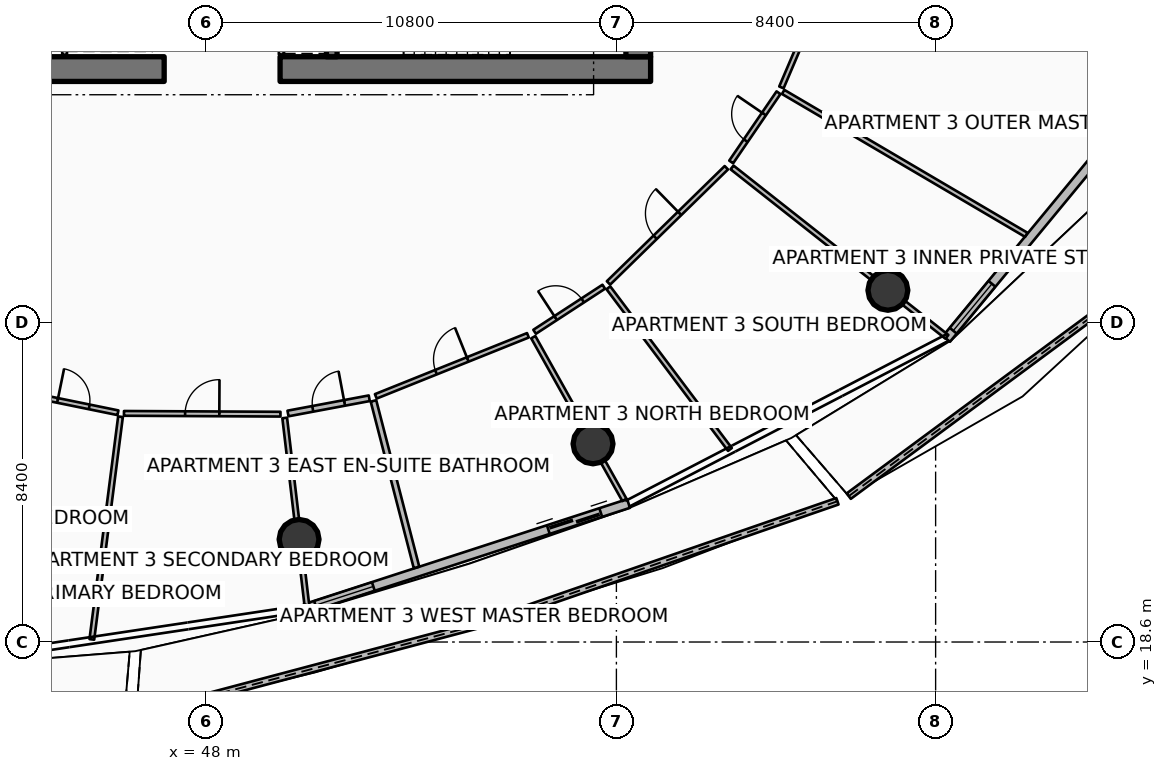
"""IFC4 building model, lengths in metres.
Left out: names, types, materials, properties, quantities, classifications, styles, units other than length and angle.
Written with IfcOpenShell. Run it as: python <this file> out.ifc"""

import sys

from ifc_helpers import new_model, si_unit, direction, frame, frame_2d, origin, origin_2d, place, context, subcontext, project, spatial, polyline, rectangle, circle, outline, extrude, element, fill, save


model = new_model("IFC4")
c1 = context("Model", 3, precision=1e-05, world=origin(), true_north=direction((0.0, 1.0)))
c2 = subcontext(c1, "Body", "Model", "MODEL_VIEW")
j1 = project(units=[si_unit("LENGTHUNIT", "METRE"), si_unit("PLANEANGLEUNIT", "RADIAN")], contexts=[c1])
p1 = place(None, origin())
s1 = spatial("IfcSite", under=j1, at=p1, CompositionType="ELEMENT")
p2 = place(p1, origin())
s2 = spatial("IfcBuilding", under=s1, at=p2, CompositionType="ELEMENT")
p3 = place(p2, frame((0.0, 0.0, 184.05)))
s3 = spatial("IfcBuildingStorey", under=s2, at=p3, CompositionType="ELEMENT", Elevation=184.05)
for number, where, z_axis, x_axis in (
    (1, (37.15, 33.675, 0.0), (0.0, 0.0, 1.0), (1.0, 0.0, 0.0)),
    (2, (49.95, 33.675, 0.0), (0.0, 0.0, 1.0), (1.0, 0.0, 0.0)),
):
    element("IfcWall", number, at=place(p3, frame(where, z_axis=z_axis, x_axis=x_axis)), inside=s3, PredefinedType="SHEAR", context=c2, shape_type="SweptSolid", body=[
        extrude(rectangle(XDim=9.75, YDim=0.65, at=frame_2d((4.875, 0.0))), origin(), (0.0, 0.0, 1.0), 3.75),
    ])
p4 = place(p3, frame((59.375, 34.0, 0.0), z_axis=(0.0, 0.0, 1.0), x_axis=(0.0, 1.0, 0.0)))
e3 = element("IfcWall", 3, at=p4, inside=s3, PredefinedType="SHEAR", context=c2, shape_type="SweptSolid", body=[
    extrude(rectangle(XDim=16.0, YDim=0.65, at=frame_2d((8.0, 0.0))), origin(), (0.0, 0.0, 1.0), 3.75),
])
p5 = place(p3, frame((51.31, 34.0, 0.0), z_axis=(0.0, 0.0, 1.0), x_axis=(0.0, 1.0, 0.0)))
e4 = element("IfcWall", 4, at=p5, inside=s3, PredefinedType="SHEAR", context=c2, shape_type="SweptSolid", body=[
    extrude(rectangle(XDim=3.5, YDim=0.28, at=frame_2d((1.75, 0.0))), origin(), (0.0, 0.0, 1.0), 3.75),
])
for number, where, z_axis, x_axis in (
    (5, (50.45, 21.3, 0.0), (0.0, 0.0, 1.0), (1.0, 0.0, 0.0)),
    (6, (58.185, 23.814, 0.0), (0.0, 0.0, 1.0), (1.0, 0.0, 0.0)),
    (7, (65.944, 27.854, 0.0), (0.0, 0.0, 1.0), (1.0, 0.0, 0.0)),
):
    element("IfcColumn", number, at=place(p3, frame(where, z_axis=z_axis, x_axis=x_axis)), inside=s3, PredefinedType="COLUMN", context=c2, shape_type="SweptSolid", body=[
        extrude(circle(Radius=0.525, at=origin_2d()), origin(), (0.0, 0.0, 1.0), 3.5),
    ])
p6 = place(p3, frame((46.162, 16.662, 0.0), z_axis=(0.0, 0.0, 1.0), x_axis=(0.96653117448, 0.256549193642, 0.0)))
e8 = element("IfcWall", 8, at=p6, inside=s3, PredefinedType="PARAPET", context=c2, shape_type="SweptSolid", body=[
    extrude(outline(polyline([(0.0, 0.0), (9.473, 0.0), (9.473, 1.148), (4.736, 1.127), (0.0, 1.224), (0.0, 0.0)])), frame((0.0, 0.09, 0.0), z_axis=(0.0, -1.0, 0.0), x_axis=(1.0, 0.0, 0.0)), (0.0, 0.0, 1.0), 0.18),
])
p7 = place(p3, frame((55.547, 19.162, 0.0), z_axis=(0.0, 0.0, 1.0), x_axis=(0.944943422405, 0.327233752007, 0.0)))
e9 = element("IfcWall", 9, at=p7, inside=s3, PredefinedType="PARAPET", context=c2, shape_type="SweptSolid", body=[
    extrude(outline(polyline([(0.0, 0.0), (9.597, 0.0), (9.598, 1.483), (4.799, 1.284), (0.0, 1.148), (0.0, 0.0)])), frame((0.0, 0.09, 0.0), z_axis=(0.0, -1.0, 0.0), x_axis=(1.0, 0.0, 0.0)), (0.0, 0.0, 1.0), 0.18),
])
p8 = place(p3, frame((64.914, 22.439, 0.0), z_axis=(0.0, 0.0, 1.0), x_axis=(0.804266043661, 0.594269409454, 0.0)))
e10 = element("IfcWall", 10, at=p8, inside=s3, PredefinedType="PARAPET", context=c2, shape_type="SweptSolid", body=[
    extrude(outline(polyline([(0.0, 0.0), (10.778, 0.0), (10.778, 1.832), (5.389, 1.696), (0.0, 1.497), (0.0, 0.0)])), frame((0.0, 0.09, 0.0), z_axis=(0.0, -1.0, 0.0), x_axis=(1.0, 0.0, 0.0)), (0.0, 0.0, 1.0), 0.18),
])
p9 = place(p3, frame((50.616, 19.481, 0.0), z_axis=(0.0, 0.0, 1.0), x_axis=(0.951058543936, 0.309010753869, 0.0)))
e11 = element("IfcWall", 11, at=p9, inside=s3, PredefinedType="SOLIDWALL", context=c2, shape_type="SweptSolid", body=[
    extrude(rectangle(XDim=8.942, YDim=0.24, at=frame_2d((4.471, 0.0))), origin(), (0.0, 0.0, 1.0), 2.45),
])
p10 = place(p9, frame((6.722, 0.0, 0.0)))
e12 = element("IfcOpeningElement", 12, at=p10, cuts=e11, PredefinedType="OPENING", context=c2, shape_type="SweptSolid", body=[
    extrude(rectangle(XDim=1.45, YDim=2.15, at=frame_2d((0.725, 1.075))), frame((0.0, 0.13, 0.0), z_axis=(0.0, -1.0, 0.0), x_axis=(1.0, 0.0, 0.0)), (0.0, 0.0, 1.0), 0.26),
])
p11 = place(p9, frame((0.28, 0.0, 0.65)))
e13 = element("IfcOpeningElement", 13, at=p11, cuts=e11, PredefinedType="OPENING", context=c2, shape_type="SweptSolid", body=[
    extrude(rectangle(XDim=1.6, YDim=1.5, at=frame_2d((0.8, 0.75))), frame((0.0, 0.13, 0.0), z_axis=(0.0, -1.0, 0.0), x_axis=(1.0, 0.0, 0.0)), (0.0, 0.0, 1.0), 0.26),
])
p12 = place(p3, frame((67.485, 26.576, 0.0), z_axis=(0.0, 0.0, 1.0), x_axis=(0.636759394418, 0.771062561418, 0.0)))
e14 = element("IfcWall", 14, at=p12, inside=s3, PredefinedType="SOLIDWALL", context=c2, shape_type="SweptSolid", body=[
    extrude(rectangle(XDim=10.494, YDim=0.24, at=frame_2d((5.247, 0.0))), origin(), (0.0, 0.0, 1.0), 2.45),
])
p13 = place(p12, frame((8.274, 0.0, 0.0)))
e15 = element("IfcOpeningElement", 15, at=p13, cuts=e14, PredefinedType="OPENING", context=c2, shape_type="SweptSolid", body=[
    extrude(rectangle(XDim=1.45, YDim=2.15, at=frame_2d((0.725, 1.075))), frame((0.0, 0.13, 0.0), z_axis=(0.0, -1.0, 0.0), x_axis=(1.0, 0.0, 0.0)), (0.0, 0.0, 1.0), 0.26),
])
p14 = place(p12, frame((0.28, 0.0, 0.65)))
e16 = element("IfcOpeningElement", 16, at=p14, cuts=e14, PredefinedType="OPENING", context=c2, shape_type="SweptSolid", body=[
    extrude(rectangle(XDim=1.6, YDim=1.5, at=frame_2d((0.8, 0.75))), frame((0.0, 0.13, 0.0), z_axis=(0.0, -1.0, 0.0), x_axis=(1.0, 0.0, 0.0)), (0.0, 0.0, 1.0), 0.26),
])
p15 = place(p3, frame((44.28, 34.05, 0.0), z_axis=(0.0, 0.0, 1.0), x_axis=(0.0, 1.0, 0.0)))
e17 = element("IfcWall", 17, at=p15, inside=s3, PredefinedType="PARTITIONING", context=c2, shape_type="SweptSolid", body=[
    extrude(rectangle(XDim=2.03, YDim=0.125, at=frame_2d((1.015, 0.0))), origin(), (0.0, 0.0, 1.0), 2.94),
])
p16 = place(p3, frame((49.98, 34.06, 0.0), z_axis=(0.0, 0.0, 1.0), x_axis=(0.0, 1.0, 0.0)))
e18 = element("IfcWall", 18, at=p16, inside=s3, PredefinedType="PARTITIONING", context=c2, shape_type="SweptSolid", body=[
    extrude(rectangle(XDim=3.4, YDim=0.125, at=frame_2d((1.7, 0.0))), origin(), (0.0, 0.0, 1.0), 2.94),
])
p17 = place(p3, frame((45.751, 24.527, 0.0), z_axis=(0.0, 0.0, 1.0), x_axis=(-0.127671016766, -0.991816571488, 0.0)))
e19 = element("IfcWall", 19, at=p17, inside=s3, PredefinedType="PARTITIONING", context=c2, shape_type="SweptSolid", body=[
    extrude(rectangle(XDim=5.907, YDim=0.125, at=frame_2d((2.954, 0.0))), origin(), (0.0, 0.0, 1.0), 2.94),
])
p18 = place(p3, frame((43.341, 25.111, 0.0), z_axis=(0.0, 0.0, 1.0), x_axis=(0.97975954564, -0.200178002605, 0.0)))
e20 = element("IfcWall", 20, at=p18, inside=s3, PredefinedType="PARTITIONING", context=c2, shape_type="SweptSolid", body=[
    extrude(rectangle(XDim=2.392, YDim=0.125, at=frame_2d((1.196, 0.0))), origin(), (0.0, 0.0, 1.0), 2.94),
])
p19 = place(p18, frame((0.771, 0.0, 0.0)))
e21 = element("IfcOpeningElement", 21, at=p19, cuts=e20, PredefinedType="OPENING", context=c2, shape_type="SweptSolid", body=[
    extrude(rectangle(XDim=0.85, YDim=2.06, at=frame_2d((0.425, 1.03))), frame((0.0, 0.073, 0.0), z_axis=(0.0, -1.0, 0.0), x_axis=(1.0, 0.0, 0.0)), (0.0, 0.0, 1.0), 0.145),
])
p20 = place(p3, frame((45.842, 24.616, 0.0), z_axis=(0.0, 0.0, 1.0), x_axis=(0.999987001814, -0.00509864719, 0.0)))
e22 = element("IfcWall", 22, at=p20, inside=s3, PredefinedType="PARTITIONING", context=c2, shape_type="SweptSolid", body=[
    extrude(rectangle(XDim=4.118, YDim=0.125, at=frame_2d((2.059, 0.0))), origin(), (0.0, 0.0, 1.0), 2.94),
])
p21 = place(p20, frame((1.609, 0.0, 0.0)))
e23 = element("IfcOpeningElement", 23, at=p21, cuts=e22, PredefinedType="OPENING", context=c2, shape_type="SweptSolid", body=[
    extrude(rectangle(XDim=0.9, YDim=2.08, at=frame_2d((0.45, 1.04))), frame((0.0, 0.073, 0.0), z_axis=(0.0, -1.0, 0.0), x_axis=(1.0, 0.0, 0.0)), (0.0, 0.0, 1.0), 0.145),
])
p22 = place(p3, frame((50.072, 24.495, 0.0), z_axis=(0.0, 0.0, 1.0), x_axis=(0.11748042549, -0.993075198375, 0.0)))
e24 = element("IfcWall", 24, at=p22, inside=s3, PredefinedType="PARTITIONING", context=c2, shape_type="SweptSolid", body=[
    extrude(rectangle(XDim=5.008, YDim=0.125, at=frame_2d((2.504, 0.0))), origin(), (0.0, 0.0, 1.0), 2.94),
])
p23 = place(p3, frame((50.158, 24.613, 0.0), z_axis=(0.0, 0.0, 1.0), x_axis=(0.982858210634, 0.184363059718, 0.0)))
e25 = element("IfcWall", 25, at=p23, inside=s3, PredefinedType="PARTITIONING", context=c2, shape_type="SweptSolid", body=[
    extrude(rectangle(XDim=2.176, YDim=0.15, at=frame_2d((1.088, 0.0))), origin(), (0.0, 0.0, 1.0), 2.94),
])
p24 = place(p23, frame((0.663, 0.0, 0.0)))
e26 = element("IfcOpeningElement", 26, at=p24, cuts=e25, PredefinedType="OPENING", context=c2, shape_type="SweptSolid", body=[
    extrude(rectangle(XDim=0.85, YDim=2.06, at=frame_2d((0.425, 1.03))), frame((0.0, 0.085, 0.0), z_axis=(0.0, -1.0, 0.0), x_axis=(1.0, 0.0, 0.0)), (0.0, 0.0, 1.0), 0.17),
])
p25 = place(p3, frame((52.408, 24.943, 0.0), z_axis=(0.0, 0.0, 1.0), x_axis=(0.250196217184, -0.968195152284, 0.0)))
e27 = element("IfcWall", 27, at=p25, inside=s3, PredefinedType="PARTITIONING", context=c2, shape_type="SweptSolid", body=[
    extrude(rectangle(XDim=4.525, YDim=0.15, at=frame_2d((2.262, 0.0))), origin(), (0.0, 0.0, 1.0), 2.94),
])
p26 = place(p3, frame((52.469, 25.064, 0.0), z_axis=(0.0, 0.0, 1.0), x_axis=(0.928030941282, 0.372503116796, 0.0)))
e28 = element("IfcWall", 28, at=p26, inside=s3, PredefinedType="PARTITIONING", context=c2, shape_type="SweptSolid", body=[
    extrude(rectangle(XDim=4.312, YDim=0.125, at=frame_2d((2.156, 0.0))), origin(), (0.0, 0.0, 1.0), 2.94),
])
p27 = place(p26, frame((1.706, 0.0, 0.0)))
e29 = element("IfcOpeningElement", 29, at=p27, cuts=e28, PredefinedType="OPENING", context=c2, shape_type="SweptSolid", body=[
    extrude(rectangle(XDim=0.9, YDim=2.08, at=frame_2d((0.45, 1.04))), frame((0.0, 0.073, 0.0), z_axis=(0.0, -1.0, 0.0), x_axis=(1.0, 0.0, 0.0)), (0.0, 0.0, 1.0), 0.145),
])
p28 = place(p3, frame((56.613, 26.621, 0.0), z_axis=(0.0, 0.0, 1.0), x_axis=(0.488583679293, -0.872517041856, 0.0)))
e30 = element("IfcWall", 30, at=p28, inside=s3, PredefinedType="PARTITIONING", context=c2, shape_type="SweptSolid", body=[
    extrude(rectangle(XDim=4.908, YDim=0.125, at=frame_2d((2.454, 0.0))), origin(), (0.0, 0.0, 1.0), 2.94),
])
p29 = place(p3, frame((58.589, 27.92, 0.0), z_axis=(0.0, 0.0, 1.0), x_axis=(0.601049014417, -0.799212163489, 0.0)))
e31 = element("IfcWall", 31, at=p29, inside=s3, PredefinedType="PARTITIONING", context=c2, shape_type="SweptSolid", body=[
    extrude(rectangle(XDim=5.322, YDim=0.125, at=frame_2d((2.661, 0.0))), origin(), (0.0, 0.0, 1.0), 2.94),
])
p30 = place(p3, frame((56.648, 26.762, 0.0), z_axis=(0.0, 0.0, 1.0), x_axis=(0.837746976104, 0.546058608602, 0.0)))
e32 = element("IfcWall", 32, at=p30, inside=s3, PredefinedType="PARTITIONING", context=c2, shape_type="SweptSolid", body=[
    extrude(rectangle(XDim=2.172, YDim=0.125, at=frame_2d((1.086, 0.0))), origin(), (0.0, 0.0, 1.0), 2.94),
])
p31 = place(p30, frame((0.661, 0.0, 0.0)))
e33 = element("IfcOpeningElement", 33, at=p31, cuts=e32, PredefinedType="OPENING", context=c2, shape_type="SweptSolid", body=[
    extrude(rectangle(XDim=0.85, YDim=2.06, at=frame_2d((0.425, 1.03))), frame((0.0, 0.073, 0.0), z_axis=(0.0, -1.0, 0.0), x_axis=(1.0, 0.0, 0.0)), (0.0, 0.0, 1.0), 0.145),
])
p32 = place(p3, frame((58.592, 28.048, 0.0), z_axis=(0.0, 0.0, 1.0), x_axis=(0.715112359848, 0.699009522677, 0.0)))
e34 = element("IfcWall", 34, at=p32, inside=s3, PredefinedType="PARTITIONING", context=c2, shape_type="SweptSolid", body=[
    extrude(rectangle(XDim=4.336, YDim=0.125, at=frame_2d((2.168, 0.0))), origin(), (0.0, 0.0, 1.0), 2.94),
])
p33 = place(p32, frame((1.718, 0.0, 0.0)))
e35 = element("IfcOpeningElement", 35, at=p33, cuts=e34, PredefinedType="OPENING", context=c2, shape_type="SweptSolid", body=[
    extrude(rectangle(XDim=0.9, YDim=2.08, at=frame_2d((0.45, 1.04))), frame((0.0, 0.073, 0.0), z_axis=(0.0, -1.0, 0.0), x_axis=(1.0, 0.0, 0.0)), (0.0, 0.0, 1.0), 0.145),
])
p34 = place(p3, frame((61.843, 31.087, 0.0), z_axis=(0.0, 0.0, 1.0), x_axis=(0.785327813677, -0.619080144299, 0.0)))
e36 = element("IfcWall", 36, at=p34, inside=s3, PredefinedType="PARTITIONING", context=c2, shape_type="SweptSolid", body=[
    extrude(rectangle(XDim=7.2, YDim=0.125, at=frame_2d((3.6, 0.0))), origin(), (0.0, 0.0, 1.0), 2.94),
])
p35 = place(p3, frame((63.188, 33.074, 0.0), z_axis=(0.0, 0.0, 1.0), x_axis=(0.862139654636, -0.506670717433, 0.0)))
e37 = element("IfcWall", 37, at=p35, inside=s3, PredefinedType="PARTITIONING", context=c2, shape_type="SweptSolid", body=[
    extrude(rectangle(XDim=7.421, YDim=0.125, at=frame_2d((3.71, 0.0))), origin(), (0.0, 0.0, 1.0), 2.94),
])
p36 = place(p3, frame((61.821, 31.232, 0.0), z_axis=(0.0, 0.0, 1.0), x_axis=(0.56426341076, 0.82559481786, 0.0)))
e38 = element("IfcWall", 38, at=p36, inside=s3, PredefinedType="PARTITIONING", context=c2, shape_type="SweptSolid", body=[
    extrude(rectangle(XDim=2.207, YDim=0.125, at=frame_2d((1.103, 0.0))), origin(), (0.0, 0.0, 1.0), 2.94),
])
p37 = place(p36, frame((0.678, 0.0, 0.0)))
e39 = element("IfcOpeningElement", 39, at=p37, cuts=e38, PredefinedType="OPENING", context=c2, shape_type="SweptSolid", body=[
    extrude(rectangle(XDim=0.85, YDim=2.06, at=frame_2d((0.425, 1.03))), frame((0.0, 0.073, 0.0), z_axis=(0.0, -1.0, 0.0), x_axis=(1.0, 0.0, 0.0)), (0.0, 0.0, 1.0), 0.145),
])
p38 = place(p3, frame((63.142, 33.193, 0.0), z_axis=(0.0, 0.0, 1.0), x_axis=(0.392302335844, 0.919836331796, 0.0)))
e40 = element("IfcWall", 40, at=p38, inside=s3, PredefinedType="PARTITIONING", context=c2, shape_type="SweptSolid", body=[
    extrude(rectangle(XDim=4.302, YDim=0.125, at=frame_2d((2.151, 0.0))), origin(), (0.0, 0.0, 1.0), 2.94),
])
p39 = place(p38, frame((1.701, 0.0, 0.0)))
e41 = element("IfcOpeningElement", 41, at=p39, cuts=e40, PredefinedType="OPENING", context=c2, shape_type="SweptSolid", body=[
    extrude(rectangle(XDim=0.9, YDim=2.08, at=frame_2d((0.45, 1.04))), frame((0.0, 0.073, 0.0), z_axis=(0.0, -1.0, 0.0), x_axis=(1.0, 0.0, 0.0)), (0.0, 0.0, 1.0), 0.145),
])
p40 = place(p10, origin())
e42 = element("IfcDoor", 42, at=p40, inside=s3, OperationType="DOUBLE_DOOR_SLIDING", PredefinedType="DOOR", context=c2, shape_type="SweptSolid", body=[
    extrude(rectangle(XDim=1.45, YDim=2.15, at=frame_2d((0.725, 1.075))), frame((0.0, 0.025, 0.0), z_axis=(0.0, -1.0, 0.0), x_axis=(1.0, 0.0, 0.0)), (0.0, 0.0, 1.0), 0.05),
])
fill(e12, e42)
p41 = place(p11, origin())
e43 = element("IfcWindow", 43, at=p41, inside=s3, PartitioningType="SINGLE_PANEL", PredefinedType="WINDOW", context=c2, shape_type="SweptSolid", body=[
    extrude(rectangle(XDim=1.6, YDim=1.5, at=frame_2d((0.8, 0.75))), frame((0.0, 0.03, 0.0), z_axis=(0.0, -1.0, 0.0), x_axis=(1.0, 0.0, 0.0)), (0.0, 0.0, 1.0), 0.06),
])
fill(e13, e43)
p42 = place(p14, origin())
e44 = element("IfcWindow", 44, at=p42, inside=s3, PartitioningType="SINGLE_PANEL", PredefinedType="WINDOW", context=c2, shape_type="SweptSolid", body=[
    extrude(rectangle(XDim=1.6, YDim=1.5, at=frame_2d((0.8, 0.75))), frame((0.0, 0.03, 0.0), z_axis=(0.0, -1.0, 0.0), x_axis=(1.0, 0.0, 0.0)), (0.0, 0.0, 1.0), 0.06),
])
fill(e16, e44)
p43 = place(p19, origin())
e45 = element("IfcDoor", 45, at=p43, inside=s3, OperationType="SINGLE_SWING_LEFT", PredefinedType="DOOR", context=c2, shape_type="SweptSolid", body=[
    extrude(rectangle(XDim=0.85, YDim=2.06, at=frame_2d((0.425, 1.03))), frame((0.0, 0.025, 0.0), z_axis=(0.0, -1.0, 0.0), x_axis=(1.0, 0.0, 0.0)), (0.0, 0.0, 1.0), 0.05),
])
fill(e21, e45)
p44 = place(p21, origin())
e46 = element("IfcDoor", 46, at=p44, inside=s3, OperationType="SINGLE_SWING_RIGHT", PredefinedType="DOOR", context=c2, shape_type="SweptSolid", body=[
    extrude(rectangle(XDim=0.9, YDim=2.08, at=frame_2d((0.45, 1.04))), frame((0.0, 0.025, 0.0), z_axis=(0.0, -1.0, 0.0), x_axis=(1.0, 0.0, 0.0)), (0.0, 0.0, 1.0), 0.05),
])
fill(e23, e46)
p45 = place(p24, origin())
e47 = element("IfcDoor", 47, at=p45, inside=s3, OperationType="SINGLE_SWING_RIGHT", PredefinedType="DOOR", context=c2, shape_type="SweptSolid", body=[
    extrude(rectangle(XDim=0.85, YDim=2.06, at=frame_2d((0.425, 1.03))), frame((0.0, 0.025, 0.0), z_axis=(0.0, -1.0, 0.0), x_axis=(1.0, 0.0, 0.0)), (0.0, 0.0, 1.0), 0.05),
])
fill(e26, e47)
p46 = place(p27, origin())
e48 = element("IfcDoor", 48, at=p46, inside=s3, OperationType="SINGLE_SWING_RIGHT", PredefinedType="DOOR", context=c2, shape_type="SweptSolid", body=[
    extrude(rectangle(XDim=0.9, YDim=2.08, at=frame_2d((0.45, 1.04))), frame((0.0, 0.025, 0.0), z_axis=(0.0, -1.0, 0.0), x_axis=(1.0, 0.0, 0.0)), (0.0, 0.0, 1.0), 0.05),
])
fill(e29, e48)
p47 = place(p31, origin())
e49 = element("IfcDoor", 49, at=p47, inside=s3, OperationType="SINGLE_SWING_LEFT", PredefinedType="DOOR", context=c2, shape_type="SweptSolid", body=[
    extrude(rectangle(XDim=0.85, YDim=2.06, at=frame_2d((0.425, 1.03))), frame((0.0, 0.025, 0.0), z_axis=(0.0, -1.0, 0.0), x_axis=(1.0, 0.0, 0.0)), (0.0, 0.0, 1.0), 0.05),
])
fill(e33, e49)
p48 = place(p33, origin())
e50 = element("IfcDoor", 50, at=p48, inside=s3, OperationType="SINGLE_SWING_RIGHT", PredefinedType="DOOR", context=c2, shape_type="SweptSolid", body=[
    extrude(rectangle(XDim=0.9, YDim=2.08, at=frame_2d((0.45, 1.04))), frame((0.0, 0.025, 0.0), z_axis=(0.0, -1.0, 0.0), x_axis=(1.0, 0.0, 0.0)), (0.0, 0.0, 1.0), 0.05),
])
fill(e35, e50)
p49 = place(p37, origin())
e51 = element("IfcDoor", 51, at=p49, inside=s3, OperationType="SINGLE_SWING_RIGHT", PredefinedType="DOOR", context=c2, shape_type="SweptSolid", body=[
    extrude(rectangle(XDim=0.85, YDim=2.06, at=frame_2d((0.425, 1.03))), frame((0.0, 0.025, 0.0), z_axis=(0.0, -1.0, 0.0), x_axis=(1.0, 0.0, 0.0)), (0.0, 0.0, 1.0), 0.05),
])
fill(e39, e51)
save(model, sys.argv[1])
